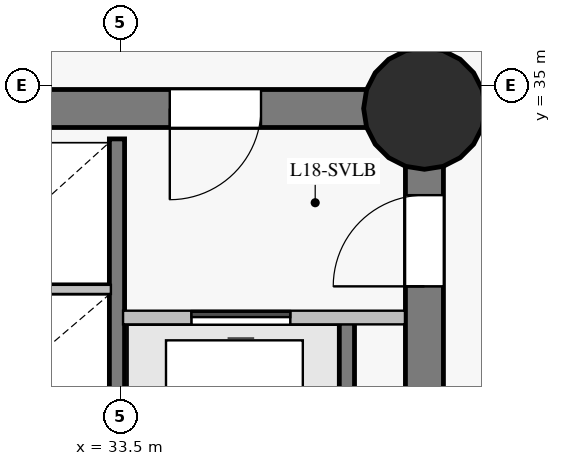
"""IFC4 building model, lengths in metres.
Left out: names, types, materials, properties, quantities, classifications, styles, units other than length and angle.
Written with IfcOpenShell. Run it as: python <this file> out.ifc"""

import sys

from ifc_helpers import new_model, si_unit, direction, frame, frame_2d, origin, origin_with_axes, origin_2d, place, context, subcontext, project, spatial, rectangle, circle, extrude, source, transform, mapped, element, fill, save


model = new_model("IFC4")
c1 = context("Model", 3, precision=1e-05, world=origin(), true_north=direction((0.0, 1.0)))
c2 = subcontext(c1, "Body", "Model", "MODEL_VIEW")
j1 = project(units=[si_unit("LENGTHUNIT", "METRE"), si_unit("PLANEANGLEUNIT", "RADIAN")], contexts=[c1])
p1 = place(None, origin())
s1 = spatial("IfcSite", under=j1, at=p1, CompositionType="ELEMENT")
p2 = place(p1, origin())
s2 = spatial("IfcBuilding", under=s1, at=p2, CompositionType="ELEMENT")
p3 = place(p2, frame((0.0, 0.0, 69.7)))
s3 = spatial("IfcBuildingStorey", under=s2, at=p3, CompositionType="ELEMENT", Elevation=69.7)
p4 = place(p3, frame((37.5, 18.3, 0.0), z_axis=(0.0, 0.0, 1.0), x_axis=(0.0, 1.0, 0.0)))
e1 = element("IfcWall", 1, at=p4, inside=s3, PredefinedType="SHEAR", context=c2, shape_type="SweptSolid", body=[
    extrude(rectangle(XDim=16.4, YDim=0.5, at=frame_2d((8.2, 0.0))), origin(), (0.0, 0.0, 1.0), 3.35),
])
p5 = place(p4, frame((14.06, 0.0, 0.0)))
e2 = element("IfcOpeningElement", 2, at=p5, cuts=e1, PredefinedType="OPENING", context=c2, shape_type="SweptSolid", body=[
    extrude(rectangle(XDim=1.2, YDim=2.15, at=frame_2d((0.6, 1.075))), frame((0.0, 0.26, 0.0), z_axis=(0.0, -1.0, 0.0), x_axis=(1.0, 0.0, 0.0)), (0.0, 0.0, 1.0), 0.52),
])
p6 = place(p3, frame((37.5, 34.7, 0.0), z_axis=(0.0, 0.0, 1.0), x_axis=(-1.0, 0.0, 0.0)))
e3 = element("IfcWall", 3, at=p6, inside=s3, PredefinedType="SHEAR", context=c2, shape_type="SweptSolid", body=[
    extrude(rectangle(XDim=10.95, YDim=0.5, at=frame_2d((5.475, 0.0))), origin(), (0.0, 0.0, 1.0), 3.35),
])
p7 = place(p6, frame((2.15, 0.0, 0.0)))
e4 = element("IfcOpeningElement", 4, at=p7, cuts=e3, PredefinedType="OPENING", context=c2, shape_type="SweptSolid", body=[
    extrude(rectangle(XDim=1.2, YDim=2.15, at=frame_2d((0.6, 1.075))), frame((0.0, 0.26, 0.0), z_axis=(0.0, -1.0, 0.0), x_axis=(1.0, 0.0, 0.0)), (0.0, 0.0, 1.0), 0.52),
])
p8 = place(p6, frame((6.35, 0.0, 0.0)))
e5 = element("IfcOpeningElement", 5, at=p8, cuts=e3, PredefinedType="OPENING", context=c2, shape_type="SweptSolid", body=[
    extrude(rectangle(XDim=1.1, YDim=2.15, at=frame_2d((0.55, 1.075))), frame((0.0, 0.26, 0.0), z_axis=(0.0, -1.0, 0.0), x_axis=(1.0, 0.0, 0.0)), (0.0, 0.0, 1.0), 0.52),
])
m1 = source(origin_with_axes(), c2, "Body", "SweptSolid", [
    extrude(circle(Radius=0.8, at=origin_2d()), origin(), (0.0, 0.0, 1.0), 3.6),
])
p9 = place(p3, frame((37.5, 34.7, 0.0), z_axis=(0.0, 0.0, 1.0), x_axis=(1.0, 0.0, 0.0)))
e6 = element("IfcColumn", 6, at=p9, inside=s3, PredefinedType="COLUMN", context=c2, shape_type="MappedRepresentation", body=[
    mapped(m1, transform((0.0, 0.0, 0.0), scale=1.0)),
])
p10 = place(p3, frame((33.455, 18.7, 0.0), z_axis=(0.0, 0.0, 1.0), x_axis=(0.0, 1.0, 0.0)))
e7 = element("IfcWall", 7, at=p10, inside=s3, PredefinedType="SHEAR", context=c2, shape_type="SweptSolid", body=[
    extrude(rectangle(XDim=15.6, YDim=0.2, at=frame_2d((7.8, 0.0))), origin(), (0.0, 0.0, 1.0), 3.35),
])
p11 = place(p10, frame((2.75, 0.0, 0.0)))
e8 = element("IfcOpeningElement", 8, at=p11, cuts=e7, PredefinedType="OPENING", context=c2, shape_type="SweptSolid", body=[
    extrude(rectangle(XDim=1.15, YDim=2.15, at=frame_2d((0.575, 1.075))), frame((0.0, 0.11, 0.0), z_axis=(0.0, -1.0, 0.0), x_axis=(1.0, 0.0, 0.0)), (0.0, 0.0, 1.0), 0.22),
])
p12 = place(p10, frame((0.55, 0.0, 0.0)))
e9 = element("IfcOpeningElement", 9, at=p12, cuts=e7, PredefinedType="OPENING", context=c2, shape_type="SweptSolid", body=[
    extrude(rectangle(XDim=0.94, YDim=2.1, at=frame_2d((0.47, 1.05))), frame((0.0, 0.11, 0.0), z_axis=(0.0, -1.0, 0.0), x_axis=(1.0, 0.0, 0.0)), (0.0, 0.0, 1.0), 0.22),
])
p13 = place(p3, frame((36.48, 29.02, 0.0), z_axis=(0.0, 0.0, 1.0), x_axis=(0.0, 1.0, 0.0)))
e10 = element("IfcWall", 10, at=p13, inside=s3, PredefinedType="SHEAR", context=c2, shape_type="SweptSolid", body=[
    extrude(rectangle(XDim=2.86, YDim=0.2, at=frame_2d((1.43, 0.0))), origin(), (0.0, 0.0, 1.0), 3.35),
])
p14 = place(p3, frame((33.535, 31.95, 0.0), z_axis=(0.0, 0.0, 1.0), x_axis=(1.0, 0.0, 0.0)))
e11 = element("IfcWall", 11, at=p14, inside=s3, PredefinedType="PARTITIONING", context=c2, shape_type="SweptSolid", body=[
    extrude(rectangle(XDim=3.709, YDim=0.18, at=frame_2d((1.854, 0.0))), origin(), (0.0, 0.0, 1.0), 3.35),
])
p15 = place(p14, frame((0.9, 0.0, 0.0)))
e12 = element("IfcOpeningElement", 12, at=p15, cuts=e11, PredefinedType="OPENING", context=c2, shape_type="SweptSolid", body=[
    extrude(rectangle(XDim=1.3, YDim=2.2, at=frame_2d((0.65, 1.1))), frame((0.0, 0.1, 0.0), z_axis=(0.0, -1.0, 0.0), x_axis=(1.0, 0.0, 0.0)), (0.0, 0.0, 1.0), 0.2),
])
p16 = place(p3, frame((31.3, 32.32, 0.0), z_axis=(0.0, 0.0, 1.0), x_axis=(1.0, 0.0, 0.0)))
e13 = element("IfcWall", 13, at=p16, inside=s3, PredefinedType="PARTITIONING", context=c2, shape_type="SweptSolid", body=[
    extrude(rectangle(XDim=2.075, YDim=0.12, at=frame_2d((1.038, 0.0))), origin(), (0.0, 0.0, 1.0), 3.35),
])
m2 = source(origin_with_axes(), c2, "Body", "SweptSolid", [
    extrude(rectangle(XDim=1.2, YDim=2.15, at=frame_2d((0.6, 1.075))), frame((0.0, 0.025, 0.0), z_axis=(0.0, -1.0, 0.0), x_axis=(1.0, 0.0, 0.0)), (0.0, 0.0, 1.0), 0.05),
])
p17 = place(p5, origin())
e14 = element("IfcDoor", 14, at=p17, inside=s3, OperationType="SINGLE_SWING_LEFT", PredefinedType="DOOR", context=c2, shape_type="MappedRepresentation", body=[
    mapped(m2, transform((0.0, 0.0, 0.0), scale=1.0)),
])
fill(e2, e14)
p18 = place(p7, origin())
e15 = element("IfcDoor", 15, at=p18, inside=s3, OperationType="SINGLE_SWING_RIGHT", PredefinedType="DOOR", context=c2, shape_type="MappedRepresentation", body=[
    mapped(m2, transform((0.0, 0.0, 0.0), scale=1.0)),
])
fill(e4, e15)
m3 = source(origin_with_axes(), c2, "Body", "SweptSolid", [
    extrude(rectangle(XDim=1.3, YDim=2.2, at=frame_2d((0.65, 1.1))), frame((0.0, 0.025, 0.0), z_axis=(0.0, -1.0, 0.0), x_axis=(1.0, 0.0, 0.0)), (0.0, 0.0, 1.0), 0.05),
])
p19 = place(p15, origin())
e16 = element("IfcDoor", 16, at=p19, inside=s3, OperationType="SLIDING_TO_LEFT", PredefinedType="DOOR", context=c2, shape_type="MappedRepresentation", body=[
    mapped(m3, transform((0.0, 0.0, 0.0), scale=1.0)),
])
fill(e12, e16)
save(model, sys.argv[1])
